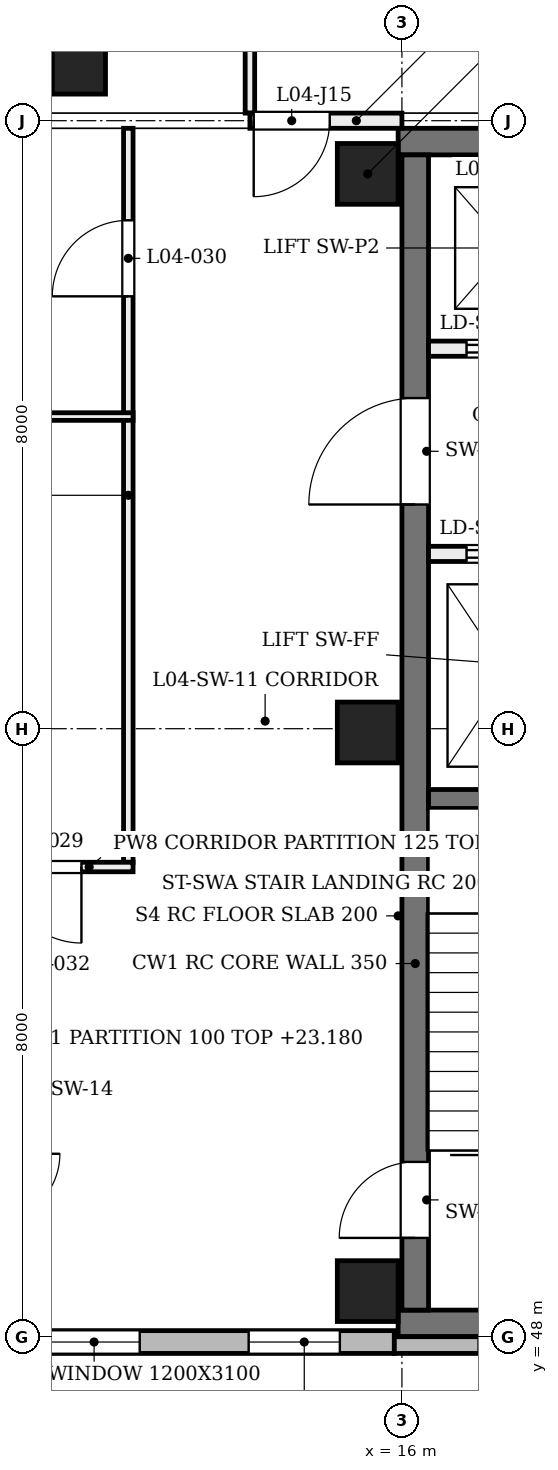
"""IFC4 building model, lengths in metres.
Left out: names, types, materials, properties, quantities, classifications, styles, units other than length and angle.
Written with IfcOpenShell. Run it as: python <this file> out.ifc"""

import sys

from ifc_helpers import new_model, si_unit, direction, frame, frame_2d, origin, origin_2d, place, context, subcontext, project, spatial, rectangle, extrude, element, fill, save


model = new_model("IFC4")
c1 = context("Model", 3, precision=1e-05, world=origin(), true_north=direction((0.0, 1.0)))
c2 = subcontext(c1, "Body", "Model", "MODEL_VIEW")
j1 = project(units=[si_unit("LENGTHUNIT", "METRE"), si_unit("PLANEANGLEUNIT", "RADIAN")], contexts=[c1])
p1 = place(None, origin())
s1 = spatial("IfcSite", under=j1, at=p1, CompositionType="ELEMENT")
p2 = place(p1, origin())
s2 = spatial("IfcBuilding", under=s1, at=p2, CompositionType="ELEMENT")
p3 = place(p2, frame((0.0, 0.0, 19.2)))
s3 = spatial("IfcBuildingStorey", under=s2, at=p3, CompositionType="ELEMENT", Elevation=19.2)
for number, where, z_axis, x_axis in (
    (1, (15.95, 48.175, 0.0), (0.0, 0.0, 1.0), (1.0, 0.0, 0.0)),
    (2, (15.95, 63.725, 0.0), (0.0, 0.0, 1.0), (1.0, 0.0, 0.0)),
):
    element("IfcWall", number, at=place(p3, frame(where, z_axis=z_axis, x_axis=x_axis)), inside=s3, PredefinedType="SHEAR", context=c2, shape_type="SweptSolid", body=[
        extrude(rectangle(XDim=7.95, YDim=0.35, at=frame_2d((3.975, 0.0))), origin(), (0.0, 0.0, 1.0), 4.58),
    ])
p4 = place(p3, frame((16.175, 48.35, 0.0), z_axis=(0.0, 0.0, 1.0), x_axis=(0.0, 1.0, 0.0)))
e3 = element("IfcWall", 3, at=p4, inside=s3, PredefinedType="SHEAR", context=c2, shape_type="SweptSolid", body=[
    extrude(rectangle(XDim=15.2, YDim=0.35, at=frame_2d((7.6, 0.0))), origin(), (0.0, 0.0, 1.0), 4.58),
])
p5 = place(p4, frame((0.95, 0.0, 0.0)))
e4 = element("IfcOpeningElement", 4, at=p5, cuts=e3, PredefinedType="OPENING", context=c2, shape_type="SweptSolid", body=[
    extrude(rectangle(XDim=1.0, YDim=2.1, at=frame_2d((0.5, 1.05))), frame((0.0, 0.185, 0.0), z_axis=(0.0, -1.0, 0.0), x_axis=(1.0, 0.0, 0.0)), (0.0, 0.0, 1.0), 0.37),
])
p6 = place(p4, frame((10.6, 0.0, 0.0)))
e5 = element("IfcOpeningElement", 5, at=p6, cuts=e3, PredefinedType="OPENING", context=c2, shape_type="SweptSolid", body=[
    extrude(rectangle(XDim=1.4, YDim=2.1, at=frame_2d((0.7, 1.05))), frame((0.0, 0.185, 0.0), z_axis=(0.0, -1.0, 0.0), x_axis=(1.0, 0.0, 0.0)), (0.0, 0.0, 1.0), 0.37),
])
for number, where, z_axis, x_axis in (
    (6, (15.55, 48.6, 0.0), (0.0, 0.0, 1.0), (1.0, 0.0, 0.0)),
    (7, (15.55, 55.95, 0.0), (0.0, 0.0, 1.0), (1.0, 0.0, 0.0)),
    (8, (15.55, 63.3, 0.0), (0.0, 0.0, 1.0), (1.0, 0.0, 0.0)),
):
    element("IfcColumn", number, at=place(p3, frame(where, z_axis=z_axis, x_axis=x_axis)), inside=s3, PredefinedType="COLUMN", context=c2, shape_type="SweptSolid", body=[
        extrude(rectangle(XDim=0.8, YDim=0.8, at=origin_2d()), origin(), (0.0, 0.0, 1.0), 4.8),
    ])
p7 = place(p3, frame((12.0, 64.7, 0.0), z_axis=(-0.203952265704, 0.0, 0.978980833987), x_axis=(0.0, -1.0, 0.0)))
e9 = element("IfcColumn", 9, at=p7, inside=s3, PredefinedType="COLUMN", context=c2, shape_type="SweptSolid", body=[
    extrude(rectangle(XDim=0.7, YDim=0.7, at=origin_2d()), origin(), (0.0, 0.0, 1.0), 4.903),
])
p8 = place(p3, frame((8.0, 47.93, 0.0), z_axis=(0.0, 0.0, 1.0), x_axis=(1.0, 0.0, 0.0)))
e10 = element("IfcWall", 10, at=p8, inside=s3, PredefinedType="SOLIDWALL", context=c2, shape_type="SweptSolid", body=[
    extrude(rectangle(XDim=7.9, YDim=0.3, at=frame_2d((3.95, 0.0))), origin(), (0.0, 0.0, 1.0), 3.9),
])
p9 = place(p8, frame((0.717, 0.0, 0.75)))
e11 = element("IfcOpeningElement", 11, at=p9, cuts=e10, PredefinedType="OPENING", context=c2, shape_type="SweptSolid", body=[
    extrude(rectangle(XDim=1.2, YDim=3.1, at=frame_2d((0.6, 1.55))), frame((0.0, 0.16, 0.0), z_axis=(0.0, -1.0, 0.0), x_axis=(1.0, 0.0, 0.0)), (0.0, 0.0, 1.0), 0.32),
])
p10 = place(p8, frame((3.35, 0.0, 0.75)))
e12 = element("IfcOpeningElement", 12, at=p10, cuts=e10, PredefinedType="OPENING", context=c2, shape_type="SweptSolid", body=[
    extrude(rectangle(XDim=1.2, YDim=3.1, at=frame_2d((0.6, 1.55))), frame((0.0, 0.16, 0.0), z_axis=(0.0, -1.0, 0.0), x_axis=(1.0, 0.0, 0.0)), (0.0, 0.0, 1.0), 0.32),
])
p11 = place(p8, frame((5.983, 0.0, 0.75)))
e13 = element("IfcOpeningElement", 13, at=p11, cuts=e10, PredefinedType="OPENING", context=c2, shape_type="SweptSolid", body=[
    extrude(rectangle(XDim=1.2, YDim=3.1, at=frame_2d((0.6, 1.55))), frame((0.0, 0.16, 0.0), z_axis=(0.0, -1.0, 0.0), x_axis=(1.0, 0.0, 0.0)), (0.0, 0.0, 1.0), 0.32),
])
p12 = place(p3, frame((15.9, 47.89, 0.0), z_axis=(0.0, 0.0, 1.0), x_axis=(1.0, 0.0, 0.0)))
e14 = element("IfcWall", 14, at=p12, inside=s3, PredefinedType="SOLIDWALL", context=c2, shape_type="SweptSolid", body=[
    extrude(rectangle(XDim=8.2, YDim=0.22, at=frame_2d((4.1, 0.0))), origin(), (0.0, 0.0, 1.0), 3.9),
])
p13 = place(p12, frame((1.108, 0.0, 0.9)))
e15 = element("IfcOpeningElement", 15, at=p13, cuts=e14, PredefinedType="OPENING", context=c2, shape_type="SweptSolid", body=[
    extrude(rectangle(XDim=0.45, YDim=2.6, at=frame_2d((0.225, 1.3))), frame((0.0, 0.12, 0.0), z_axis=(0.0, -1.0, 0.0), x_axis=(1.0, 0.0, 0.0)), (0.0, 0.0, 1.0), 0.24),
])
p14 = place(p12, frame((3.775, 0.0, 0.9)))
e16 = element("IfcOpeningElement", 16, at=p14, cuts=e14, PredefinedType="OPENING", context=c2, shape_type="SweptSolid", body=[
    extrude(rectangle(XDim=0.45, YDim=2.6, at=frame_2d((0.225, 1.3))), frame((0.0, 0.12, 0.0), z_axis=(0.0, -1.0, 0.0), x_axis=(1.0, 0.0, 0.0)), (0.0, 0.0, 1.0), 0.24),
])
p15 = place(p12, frame((6.442, 0.0, 0.9)))
e17 = element("IfcOpeningElement", 17, at=p15, cuts=e14, PredefinedType="OPENING", context=c2, shape_type="SweptSolid", body=[
    extrude(rectangle(XDim=0.45, YDim=2.6, at=frame_2d((0.225, 1.3))), frame((0.0, 0.12, 0.0), z_axis=(0.0, -1.0, 0.0), x_axis=(1.0, 0.0, 0.0)), (0.0, 0.0, 1.0), 0.24),
])
p16 = place(p3, frame((16.35, 55.075, 0.0), z_axis=(0.0, 0.0, 1.0), x_axis=(1.0, 0.0, 0.0)))
e18 = element("IfcWall", 18, at=p16, inside=s3, PredefinedType="SOLIDWALL", context=c2, shape_type="SweptSolid", body=[
    extrude(rectangle(XDim=3.1, YDim=0.25, at=frame_2d((1.55, 0.0))), origin(), (0.0, 0.0, 1.0), 4.55),
])
p17 = place(p3, frame((16.35, 58.3, 0.0), z_axis=(0.0, 0.0, 1.0), x_axis=(1.0, 0.0, 0.0)))
e19 = element("IfcWall", 19, at=p17, inside=s3, PredefinedType="SOLIDWALL", context=c2, shape_type="SweptSolid", body=[
    extrude(rectangle(XDim=7.2, YDim=0.2, at=frame_2d((3.6, 0.0))), origin(), (0.0, 0.0, 1.0), 4.55),
])
p18 = place(p17, frame((0.5, 0.0, 0.0)))
e20 = element("IfcOpeningElement", 20, at=p18, cuts=e19, PredefinedType="OPENING", context=c2, shape_type="SweptSolid", body=[
    extrude(rectangle(XDim=1.1, YDim=2.1, at=frame_2d((0.55, 1.05))), frame((0.0, 0.11, 0.0), z_axis=(0.0, -1.0, 0.0), x_axis=(1.0, 0.0, 0.0)), (0.0, 0.0, 1.0), 0.22),
])
p19 = place(p17, frame((5.6, 0.0, 0.0)))
e21 = element("IfcOpeningElement", 21, at=p19, cuts=e19, PredefinedType="OPENING", context=c2, shape_type="SweptSolid", body=[
    extrude(rectangle(XDim=1.1, YDim=2.1, at=frame_2d((0.55, 1.05))), frame((0.0, 0.11, 0.0), z_axis=(0.0, -1.0, 0.0), x_axis=(1.0, 0.0, 0.0)), (0.0, 0.0, 1.0), 0.22),
])
p20 = place(p17, frame((3.1, 0.0, 0.0)))
e22 = element("IfcOpeningElement", 22, at=p20, cuts=e19, PredefinedType="OPENING", context=c2, shape_type="SweptSolid", body=[
    extrude(rectangle(XDim=1.0, YDim=2.1, at=frame_2d((0.5, 1.05))), frame((0.0, 0.11, 0.0), z_axis=(0.0, -1.0, 0.0), x_axis=(1.0, 0.0, 0.0)), (0.0, 0.0, 1.0), 0.22),
])
p21 = place(p3, frame((16.35, 61.0, 0.0), z_axis=(0.0, 0.0, 1.0), x_axis=(1.0, 0.0, 0.0)))
e23 = element("IfcWall", 23, at=p21, inside=s3, PredefinedType="SOLIDWALL", context=c2, shape_type="SweptSolid", body=[
    extrude(rectangle(XDim=7.2, YDim=0.2, at=frame_2d((3.6, 0.0))), origin(), (0.0, 0.0, 1.0), 4.55),
])
p22 = place(p21, frame((0.5, 0.0, 0.0)))
e24 = element("IfcOpeningElement", 24, at=p22, cuts=e23, PredefinedType="OPENING", context=c2, shape_type="SweptSolid", body=[
    extrude(rectangle(XDim=1.1, YDim=2.1, at=frame_2d((0.55, 1.05))), frame((0.0, 0.11, 0.0), z_axis=(0.0, -1.0, 0.0), x_axis=(1.0, 0.0, 0.0)), (0.0, 0.0, 1.0), 0.22),
])
p23 = place(p21, frame((5.6, 0.0, 0.0)))
e25 = element("IfcOpeningElement", 25, at=p23, cuts=e23, PredefinedType="OPENING", context=c2, shape_type="SweptSolid", body=[
    extrude(rectangle(XDim=1.1, YDim=2.1, at=frame_2d((0.55, 1.05))), frame((0.0, 0.11, 0.0), z_axis=(0.0, -1.0, 0.0), x_axis=(1.0, 0.0, 0.0)), (0.0, 0.0, 1.0), 0.22),
])
p24 = place(p21, frame((3.1, 0.0, 0.0)))
e26 = element("IfcOpeningElement", 26, at=p24, cuts=e23, PredefinedType="OPENING", context=c2, shape_type="SweptSolid", body=[
    extrude(rectangle(XDim=1.0, YDim=2.1, at=frame_2d((0.5, 1.05))), frame((0.0, 0.11, 0.0), z_axis=(0.0, -1.0, 0.0), x_axis=(1.0, 0.0, 0.0)), (0.0, 0.0, 1.0), 0.22),
])
p25 = place(p3, frame((14.0, 64.1, 0.0), z_axis=(0.0, 0.0, 1.0), x_axis=(0.0, 1.0, 0.0)))
e27 = element("IfcWall", 27, at=p25, inside=s3, PredefinedType="PARTITIONING", context=c2, shape_type="SweptSolid", body=[
    extrude(rectangle(XDim=4.037, YDim=0.125, at=frame_2d((2.019, 0.0))), origin(), (0.0, 0.0, 1.0), 3.88),
])
p26 = place(p25, frame((1.75, 0.0, 0.0)))
e28 = element("IfcOpeningElement", 28, at=p26, cuts=e27, PredefinedType="OPENING", context=c2, shape_type="SweptSolid", body=[
    extrude(rectangle(XDim=1.15, YDim=2.1, at=frame_2d((0.575, 1.05))), frame((0.0, 0.073, 0.0), z_axis=(0.0, -1.0, 0.0), x_axis=(1.0, 0.0, 0.0)), (0.0, 0.0, 1.0), 0.145),
])
p27 = place(p3, frame((12.4, 54.242, 0.0), z_axis=(0.0, 0.0, 1.0), x_axis=(0.0, 1.0, 0.0)))
e29 = element("IfcWall", 29, at=p27, inside=s3, PredefinedType="PARTITIONING", context=c2, shape_type="SweptSolid", body=[
    extrude(rectangle(XDim=9.658, YDim=0.125, at=frame_2d((4.829, 0.0))), origin(), (0.0, 0.0, 1.0), 3.88),
])
p28 = place(p27, frame((7.447, 0.0, 0.0)))
e30 = element("IfcOpeningElement", 30, at=p28, cuts=e29, PredefinedType="OPENING", context=c2, shape_type="SweptSolid", body=[
    extrude(rectangle(XDim=1.0, YDim=2.1, at=frame_2d((0.5, 1.05))), frame((0.0, 0.073, 0.0), z_axis=(0.0, -1.0, 0.0), x_axis=(1.0, 0.0, 0.0)), (0.0, 0.0, 1.0), 0.145),
])
p29 = place(p3, frame((10.538, 54.18, 0.0), z_axis=(0.0, 0.0, 1.0), x_axis=(1.0, 0.0, 0.0)))
e31 = element("IfcWall", 31, at=p29, inside=s3, PredefinedType="PARTITIONING", context=c2, shape_type="SweptSolid", body=[
    extrude(rectangle(XDim=1.925, YDim=0.125, at=frame_2d((0.962, 0.0))), origin(), (0.0, 0.0, 1.0), 4.56),
])
p30 = place(p29, frame((0.246, 0.0, 0.0)))
e32 = element("IfcOpeningElement", 32, at=p30, cuts=e31, PredefinedType="OPENING", context=c2, shape_type="SweptSolid", body=[
    extrude(rectangle(XDim=1.0, YDim=2.1, at=frame_2d((0.5, 1.05))), frame((0.0, 0.073, 0.0), z_axis=(0.0, -1.0, 0.0), x_axis=(1.0, 0.0, 0.0)), (0.0, 0.0, 1.0), 0.145),
])
p31 = place(p3, frame((8.3, 60.107, 0.0), z_axis=(0.0, 0.0, 1.0), x_axis=(1.0, 0.0, 0.0)))
e33 = element("IfcWall", 33, at=p31, inside=s3, PredefinedType="PARTITIONING", context=c2, shape_type="SweptSolid", body=[
    extrude(rectangle(XDim=4.162, YDim=0.1, at=frame_2d((2.081, 0.0))), origin(), (0.0, 0.0, 1.0), 3.98),
])
p32 = place(p3, frame((14.0, 64.0, 0.0), z_axis=(0.0, 0.0, 1.0), x_axis=(1.0, 0.0, 0.0)))
e34 = element("IfcWall", 34, at=p32, inside=s3, PredefinedType="PARTITIONING", context=c2, shape_type="SweptSolid", body=[
    extrude(rectangle(XDim=2.0, YDim=0.2, at=frame_2d((1.0, 0.0))), origin(), (0.0, 0.0, 1.0), 3.88),
])
p33 = place(p32, frame((0.05, 0.0, 0.0)))
e35 = element("IfcOpeningElement", 35, at=p33, cuts=e34, PredefinedType="OPENING", context=c2, shape_type="SweptSolid", body=[
    extrude(rectangle(XDim=1.0, YDim=2.1, at=frame_2d((0.5, 1.05))), frame((0.0, 0.11, 0.0), z_axis=(0.0, -1.0, 0.0), x_axis=(1.0, 0.0, 0.0)), (0.0, 0.0, 1.0), 0.22),
])
p34 = place(p10, origin())
e36 = element("IfcWindow", 36, at=p34, inside=s3, PartitioningType="SINGLE_PANEL", PredefinedType="WINDOW", context=c2, shape_type="SweptSolid", body=[
    extrude(rectangle(XDim=1.2, YDim=3.1, at=frame_2d((0.6, 1.55))), frame((0.0, 0.03, 0.0), z_axis=(0.0, -1.0, 0.0), x_axis=(1.0, 0.0, 0.0)), (0.0, 0.0, 1.0), 0.06),
])
fill(e12, e36)
p35 = place(p11, origin())
e37 = element("IfcWindow", 37, at=p35, inside=s3, PartitioningType="SINGLE_PANEL", PredefinedType="WINDOW", context=c2, shape_type="SweptSolid", body=[
    extrude(rectangle(XDim=1.2, YDim=3.1, at=frame_2d((0.6, 1.55))), frame((0.0, 0.03, 0.0), z_axis=(0.0, -1.0, 0.0), x_axis=(1.0, 0.0, 0.0)), (0.0, 0.0, 1.0), 0.06),
])
fill(e13, e37)
p36 = place(p5, origin())
e38 = element("IfcDoor", 38, at=p36, inside=s3, OperationType="SINGLE_SWING_LEFT", PredefinedType="DOOR", context=c2, shape_type="SweptSolid", body=[
    extrude(rectangle(XDim=1.0, YDim=2.1, at=frame_2d((0.5, 1.05))), frame((0.0, 0.025, 0.0), z_axis=(0.0, -1.0, 0.0), x_axis=(1.0, 0.0, 0.0)), (0.0, 0.0, 1.0), 0.05),
])
fill(e4, e38)
p37 = place(p18, origin())
e39 = element("IfcDoor", 39, at=p37, inside=s3, OperationType="DOUBLE_DOOR_SLIDING", PredefinedType="DOOR", context=c2, shape_type="SweptSolid", body=[
    extrude(rectangle(XDim=1.1, YDim=2.1, at=frame_2d((0.55, 1.05))), frame((0.0, 0.025, 0.0), z_axis=(0.0, -1.0, 0.0), x_axis=(1.0, 0.0, 0.0)), (0.0, 0.0, 1.0), 0.05),
])
fill(e20, e39)
p38 = place(p22, frame((1.1, 0.0, 0.0), z_axis=(0.0, 0.0, 1.0), x_axis=(-1.0, 0.0, 0.0)))
e40 = element("IfcDoor", 40, at=p38, inside=s3, OperationType="DOUBLE_DOOR_SLIDING", PredefinedType="DOOR", context=c2, shape_type="SweptSolid", body=[
    extrude(rectangle(XDim=1.1, YDim=2.1, at=frame_2d((0.55, 1.05))), frame((0.0, 0.025, 0.0), z_axis=(0.0, -1.0, 0.0), x_axis=(1.0, 0.0, 0.0)), (0.0, 0.0, 1.0), 0.05),
])
fill(e24, e40)
p39 = place(p6, origin())
e41 = element("IfcDoor", 41, at=p39, inside=s3, OperationType="SINGLE_SWING_LEFT", PredefinedType="DOOR", context=c2, shape_type="SweptSolid", body=[
    extrude(rectangle(XDim=1.4, YDim=2.1, at=frame_2d((0.7, 1.05))), frame((0.0, 0.025, 0.0), z_axis=(0.0, -1.0, 0.0), x_axis=(1.0, 0.0, 0.0)), (0.0, 0.0, 1.0), 0.05),
])
fill(e5, e41)
p40 = place(p30, origin())
e42 = element("IfcDoor", 42, at=p40, inside=s3, OperationType="SINGLE_SWING_RIGHT", PredefinedType="DOOR", context=c2, shape_type="SweptSolid", body=[
    extrude(rectangle(XDim=1.0, YDim=2.1, at=frame_2d((0.5, 1.05))), frame((0.0, 0.025, 0.0), z_axis=(0.0, -1.0, 0.0), x_axis=(1.0, 0.0, 0.0)), (0.0, 0.0, 1.0), 0.05),
])
fill(e32, e42)
p41 = place(p28, origin())
e43 = element("IfcDoor", 43, at=p41, inside=s3, OperationType="SINGLE_SWING_LEFT", PredefinedType="DOOR", context=c2, shape_type="SweptSolid", body=[
    extrude(rectangle(XDim=1.0, YDim=2.1, at=frame_2d((0.5, 1.05))), frame((0.0, 0.025, 0.0), z_axis=(0.0, -1.0, 0.0), x_axis=(1.0, 0.0, 0.0)), (0.0, 0.0, 1.0), 0.05),
])
fill(e30, e43)
p42 = place(p33, frame((1.0, 0.0, 0.0), z_axis=(0.0, 0.0, 1.0), x_axis=(-1.0, 0.0, 0.0)))
e44 = element("IfcDoor", 44, at=p42, inside=s3, OperationType="SINGLE_SWING_LEFT", PredefinedType="DOOR", context=c2, shape_type="SweptSolid", body=[
    extrude(rectangle(XDim=1.0, YDim=2.1, at=frame_2d((0.5, 1.05))), frame((0.0, 0.025, 0.0), z_axis=(0.0, -1.0, 0.0), x_axis=(1.0, 0.0, 0.0)), (0.0, 0.0, 1.0), 0.05),
])
fill(e35, e44)
save(model, sys.argv[1])
